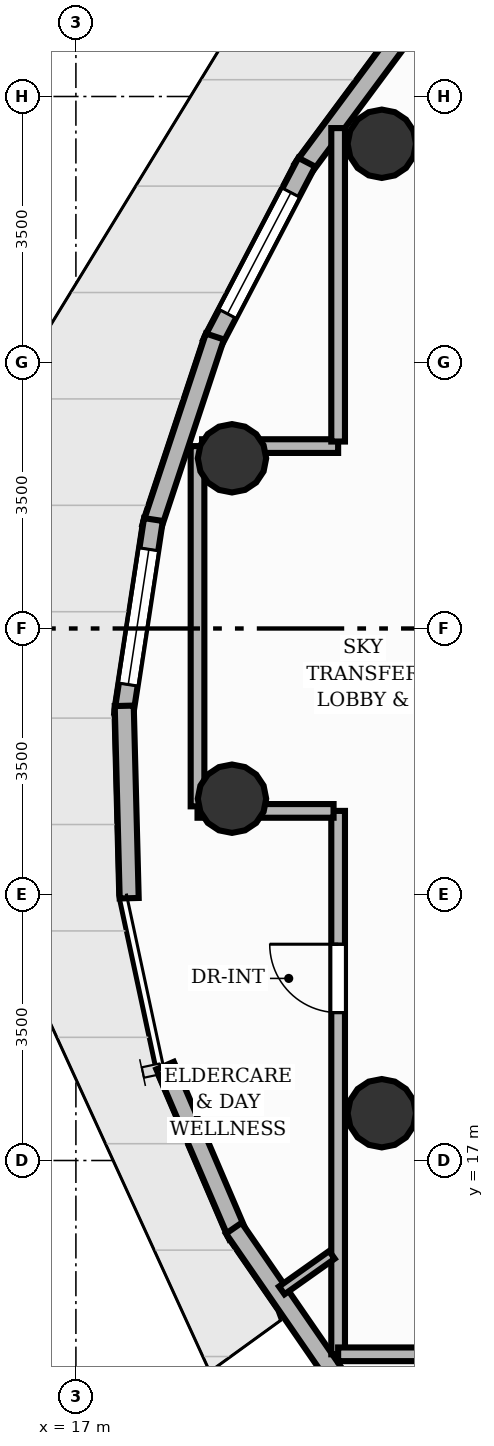
"""IFC4 building model, lengths in metres.
Left out: names, types, materials, properties, quantities, classifications, styles, units other than length and angle.
Written with IfcOpenShell. Run it as: python <this file> out.ifc"""

import sys

from ifc_helpers import new_model, si_unit, direction, frame, frame_2d, origin, origin_2d, place, context, subcontext, project, spatial, rectangle, circle, extrude, element, fill, save


model = new_model("IFC4")
c1 = context("Model", 3, precision=1e-05, world=origin(), true_north=direction((0.0, 1.0)))
c2 = subcontext(c1, "Body", "Model", "MODEL_VIEW")
j1 = project(units=[si_unit("LENGTHUNIT", "METRE"), si_unit("PLANEANGLEUNIT", "RADIAN")], contexts=[c1])
p1 = place(None, origin())
s1 = spatial("IfcSite", under=j1, at=p1, CompositionType="ELEMENT")
p2 = place(p1, origin())
s2 = spatial("IfcBuilding", under=s1, at=p2, CompositionType="ELEMENT")
p3 = place(p2, frame((0.0, 0.0, 163.04)))
s3 = spatial("IfcBuildingStorey", under=s2, at=p3, CompositionType="ELEMENT", Elevation=163.04)
for number, where, z_axis, x_axis in (
    (1, (21.025, 30.378, 0.0), (0.0, 0.0, 1.0), (1.0, 0.0, 0.0)),
    (2, (19.054, 26.24, 0.0), (0.0, 0.0, 1.0), (1.0, 0.0, 0.0)),
    (3, (19.054, 21.76, 0.0), (0.0, 0.0, 1.0), (1.0, 0.0, 0.0)),
    (4, (21.025, 17.622, 0.0), (0.0, 0.0, 1.0), (1.0, 0.0, 0.0)),
):
    element("IfcColumn", number, at=place(p3, frame(where, z_axis=z_axis, x_axis=x_axis)), inside=s3, PredefinedType="COLUMN", context=c2, shape_type="SweptSolid", body=[
        extrude(circle(Radius=0.45, at=origin_2d()), origin(), (0.0, 0.0, 1.0), 3.2),
    ])
p4 = place(p3, frame((19.979, 30.042, 0.0), z_axis=(0.0, 0.0, 1.0), x_axis=(0.595783859774, 0.803144814111, 0.0)))
e5 = element("IfcWall", 5, at=p4, inside=s3, PredefinedType="SOLIDWALL", context=c2, shape_type="SweptSolid", body=[
    extrude(rectangle(XDim=2.739, YDim=0.25, at=frame_2d((1.369, 0.0))), origin(), (0.0, 0.0, 1.0), 2.96),
])
p5 = place(p3, frame((18.785, 27.741, 0.0), z_axis=(0.0, 0.0, 1.0), x_axis=(0.463513901258, 0.886089647463, 0.0)))
e6 = element("IfcWall", 6, at=p5, inside=s3, PredefinedType="SOLIDWALL", context=c2, shape_type="SweptSolid", body=[
    extrude(rectangle(XDim=2.701, YDim=0.25, at=frame_2d((1.351, 0.0))), origin(), (0.0, 0.0, 1.0), 2.96),
])
p6 = place(p5, frame((0.451, 0.0, 0.85)))
e7 = element("IfcOpeningElement", 7, at=p6, cuts=e6, PredefinedType="OPENING", context=c2, shape_type="SweptSolid", body=[
    extrude(rectangle(XDim=1.8, YDim=2.0, at=frame_2d((0.9, 1.0))), frame((0.0, 0.135, 0.0), z_axis=(0.0, -1.0, 0.0), x_axis=(1.0, 0.0, 0.0)), (0.0, 0.0, 1.0), 0.27),
])
p7 = place(p3, frame((17.994, 25.326, 0.0), z_axis=(0.0, 0.0, 1.0), x_axis=(0.314763160498, 0.949170244368, 0.0)))
e8 = element("IfcWall", 8, at=p7, inside=s3, PredefinedType="SOLIDWALL", context=c2, shape_type="SweptSolid", body=[
    extrude(rectangle(XDim=2.651, YDim=0.25, at=frame_2d((1.326, 0.0))), origin(), (0.0, 0.0, 1.0), 2.96),
])
p8 = place(p3, frame((17.629, 22.871, 0.0), z_axis=(0.0, 0.0, 1.0), x_axis=(0.150882230886, 0.988551744929, 0.0)))
e9 = element("IfcWall", 9, at=p8, inside=s3, PredefinedType="SOLIDWALL", context=c2, shape_type="SweptSolid", body=[
    extrude(rectangle(XDim=2.592, YDim=0.25, at=frame_2d((1.296, 0.0))), origin(), (0.0, 0.0, 1.0), 2.96),
])
p9 = place(p8, frame((0.396, 0.0, 0.85)))
e10 = element("IfcOpeningElement", 10, at=p9, cuts=e9, PredefinedType="OPENING", context=c2, shape_type="SweptSolid", body=[
    extrude(rectangle(XDim=1.8, YDim=2.0, at=frame_2d((0.9, 1.0))), frame((0.0, 0.135, 0.0), z_axis=(0.0, -1.0, 0.0), x_axis=(1.0, 0.0, 0.0)), (0.0, 0.0, 1.0), 0.27),
])
p10 = place(p3, frame((17.701, 20.451, 0.0), z_axis=(0.0, 0.0, 1.0), x_axis=(-0.025647424719, 0.999671050699, 0.0)))
e11 = element("IfcWall", 11, at=p10, inside=s3, PredefinedType="SOLIDWALL", context=c2, shape_type="SweptSolid", body=[
    extrude(rectangle(XDim=2.532, YDim=0.25, at=frame_2d((1.266, 0.0))), origin(), (0.0, 0.0, 1.0), 2.96),
])
p11 = place(p3, frame((19.133, 16.009, 0.0), z_axis=(0.0, 0.0, 1.0), x_axis=(-0.393822567199, 0.919186480299, 0.0)))
e12 = element("IfcWall", 12, at=p11, inside=s3, PredefinedType="SOLIDWALL", context=c2, shape_type="SweptSolid", body=[
    extrude(rectangle(XDim=2.437, YDim=0.25, at=frame_2d((1.219, 0.0))), origin(), (0.0, 0.0, 1.0), 2.96),
])
p12 = place(p3, frame((20.448, 14.121, 0.0), z_axis=(0.0, 0.0, 1.0), x_axis=(-0.567536828079, 0.823348011945, 0.0)))
e13 = element("IfcWall", 13, at=p12, inside=s3, PredefinedType="SOLIDWALL", context=c2, shape_type="SweptSolid", body=[
    extrude(rectangle(XDim=2.415, YDim=0.25, at=frame_2d((1.207, 0.0))), origin(), (0.0, 0.0, 1.0), 2.96),
])
p13 = place(p3, frame((20.45, 14.45, 0.0), z_axis=(0.0, 0.0, 1.0), x_axis=(0.0, 1.0, 0.0)))
e14 = element("IfcWall", 14, at=p13, inside=s3, PredefinedType="PARTITIONING", context=c2, shape_type="SweptSolid", body=[
    extrude(rectangle(XDim=7.15, YDim=0.18, at=frame_2d((3.575, 0.0))), origin(), (0.0, 0.0, 1.0), 2.488),
])
p14 = place(p13, frame((4.496, 0.0, 0.0)))
e15 = element("IfcOpeningElement", 15, at=p14, cuts=e14, PredefinedType="OPENING", context=c2, shape_type="SweptSolid", body=[
    extrude(rectangle(XDim=0.9, YDim=2.1, at=frame_2d((0.45, 1.05))), frame((0.0, 0.1, 0.0), z_axis=(0.0, -1.0, 0.0), x_axis=(1.0, 0.0, 0.0)), (0.0, 0.0, 1.0), 0.2),
])
p15 = place(p3, frame((20.39, 21.6, 0.0), z_axis=(0.0, 0.0, 1.0), x_axis=(-1.0, 0.0, 0.0)))
e16 = element("IfcWall", 16, at=p15, inside=s3, PredefinedType="PARTITIONING", context=c2, shape_type="SweptSolid", body=[
    extrude(rectangle(XDim=1.79, YDim=0.18, at=frame_2d((0.895, 0.0))), origin(), (0.0, 0.0, 1.0), 2.403),
])
p16 = place(p3, frame((18.6, 21.66, 0.0), z_axis=(0.0, 0.0, 1.0), x_axis=(0.0, 1.0, 0.0)))
e17 = element("IfcWall", 17, at=p16, inside=s3, PredefinedType="PARTITIONING", context=c2, shape_type="SweptSolid", body=[
    extrude(rectangle(XDim=4.74, YDim=0.18, at=frame_2d((2.37, 0.0))), origin(), (0.0, 0.0, 1.0), 2.57),
])
p17 = place(p3, frame((18.66, 26.4, 0.0), z_axis=(0.0, 0.0, 1.0), x_axis=(1.0, 0.0, 0.0)))
e18 = element("IfcWall", 18, at=p17, inside=s3, PredefinedType="PARTITIONING", context=c2, shape_type="SweptSolid", body=[
    extrude(rectangle(XDim=1.79, YDim=0.18, at=frame_2d((0.895, 0.0))), origin(), (0.0, 0.0, 1.0), 2.403),
])
p18 = place(p3, frame((20.45, 26.46, 0.0), z_axis=(0.0, 0.0, 1.0), x_axis=(0.0, 1.0, 0.0)))
e19 = element("IfcWall", 19, at=p18, inside=s3, PredefinedType="PARTITIONING", context=c2, shape_type="SweptSolid", body=[
    extrude(rectangle(XDim=4.124, YDim=0.18, at=frame_2d((2.062, 0.0))), origin(), (0.0, 0.0, 1.0), 2.488),
])
p19 = place(p3, frame((40.05, 14.45, 0.0), z_axis=(0.0, 0.0, 1.0), x_axis=(-1.0, 0.0, 0.0)))
e20 = element("IfcWall", 20, at=p19, inside=s3, PredefinedType="PARTITIONING", context=c2, shape_type="SweptSolid", body=[
    extrude(rectangle(XDim=19.6, YDim=0.18, at=frame_2d((9.8, 0.0))), origin(), (0.0, 0.0, 1.0), 2.488),
])
p20 = place(p19, frame((11.105, 0.0, 0.0)))
e21 = element("IfcOpeningElement", 21, at=p20, cuts=e20, PredefinedType="OPENING", context=c2, shape_type="SweptSolid", body=[
    extrude(rectangle(XDim=0.9, YDim=2.1, at=frame_2d((0.45, 1.05))), frame((0.0, 0.1, 0.0), z_axis=(0.0, -1.0, 0.0), x_axis=(1.0, 0.0, 0.0)), (0.0, 0.0, 1.0), 0.2),
])
p21 = place(p19, frame((2.026, 0.0, 0.0)))
e22 = element("IfcOpeningElement", 22, at=p21, cuts=e20, PredefinedType="OPENING", context=c2, shape_type="SweptSolid", body=[
    extrude(rectangle(XDim=0.9, YDim=2.1, at=frame_2d((0.45, 1.05))), frame((0.0, 0.1, 0.0), z_axis=(0.0, -1.0, 0.0), x_axis=(1.0, 0.0, 0.0)), (0.0, 0.0, 1.0), 0.2),
])
p22 = place(p3, frame((20.368, 15.758, 0.0), z_axis=(0.0, 0.0, 1.0), x_axis=(-0.815971082195, -0.57809272009, 0.0)))
e23 = element("IfcWall", 23, at=p22, inside=s3, PredefinedType="PARTITIONING", context=c2, shape_type="SweptSolid", body=[
    extrude(rectangle(XDim=0.809, YDim=0.125, at=frame_2d((0.404, 0.0))), origin(), (0.0, 0.0, 1.0), 2.955),
])
p23 = place(p6, origin())
e24 = element("IfcWindow", 24, at=p23, inside=s3, PartitioningType="SINGLE_PANEL", PredefinedType="WINDOW", context=c2, shape_type="SweptSolid", body=[
    extrude(rectangle(XDim=1.8, YDim=2.0, at=frame_2d((0.9, 1.0))), frame((0.0, 0.03, 0.0), z_axis=(0.0, -1.0, 0.0), x_axis=(1.0, 0.0, 0.0)), (0.0, 0.0, 1.0), 0.06),
])
fill(e7, e24)
p24 = place(p9, origin())
e25 = element("IfcWindow", 25, at=p24, inside=s3, PartitioningType="SINGLE_PANEL", PredefinedType="WINDOW", context=c2, shape_type="SweptSolid", body=[
    extrude(rectangle(XDim=1.8, YDim=2.0, at=frame_2d((0.9, 1.0))), frame((0.0, 0.03, 0.0), z_axis=(0.0, -1.0, 0.0), x_axis=(1.0, 0.0, 0.0)), (0.0, 0.0, 1.0), 0.06),
])
fill(e10, e25)
p25 = place(p14, origin())
e26 = element("IfcDoor", 26, at=p25, inside=s3, OperationType="SINGLE_SWING_RIGHT", PredefinedType="DOOR", context=c2, shape_type="SweptSolid", body=[
    extrude(rectangle(XDim=0.9, YDim=2.1, at=frame_2d((0.45, 1.05))), frame((0.0, 0.025, 0.0), z_axis=(0.0, -1.0, 0.0), x_axis=(1.0, 0.0, 0.0)), (0.0, 0.0, 1.0), 0.05),
])
fill(e15, e26)
save(model, sys.argv[1])
